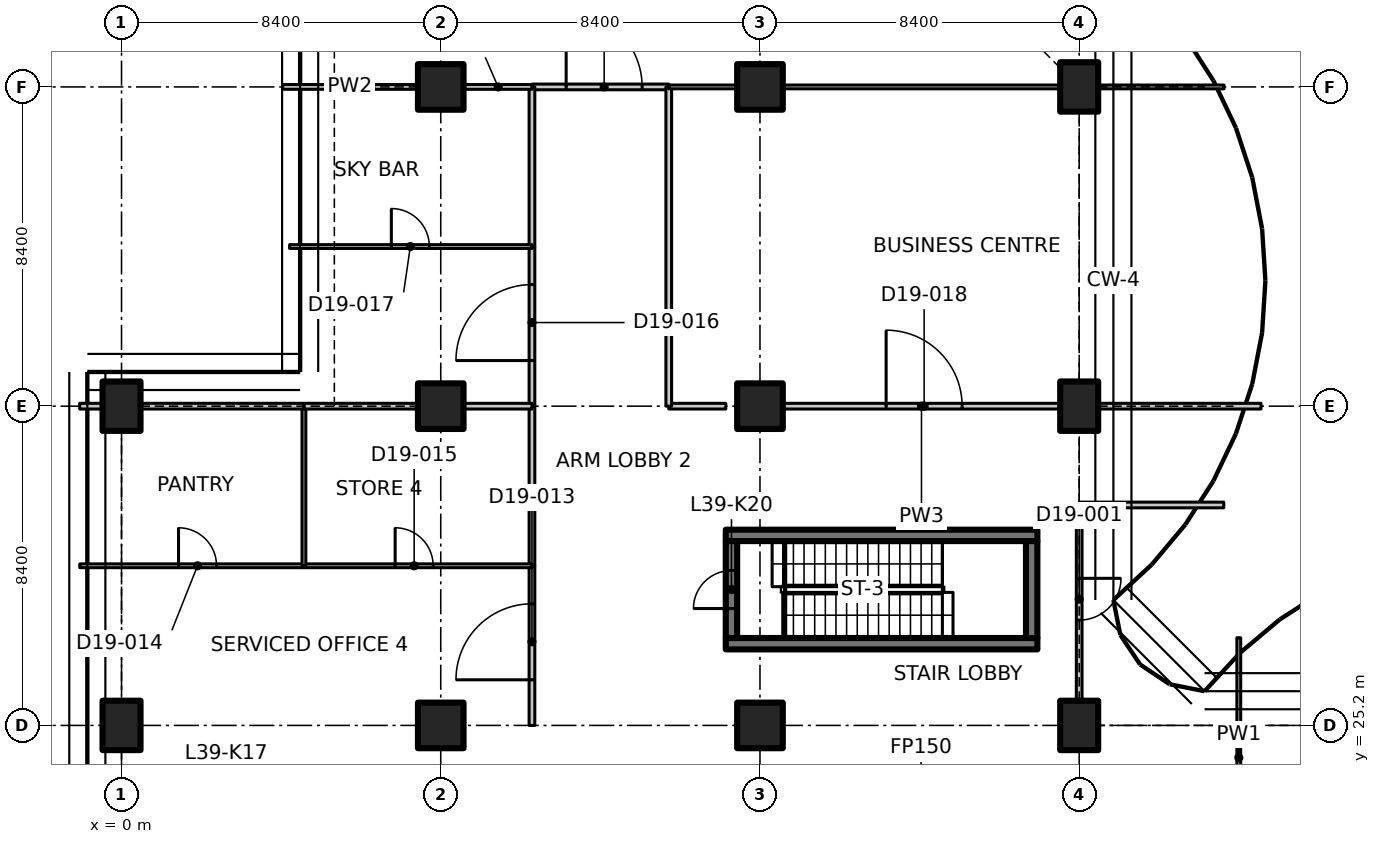
"""IFC4 building model, lengths in metres.
Left out: names, types, materials, properties, quantities, classifications, styles, units other than length and angle.
Written with IfcOpenShell. Run it as: python <this file> out.ifc"""

import sys

from ifc_helpers import new_model, si_unit, direction, frame, frame_2d, origin, origin_2d, place, context, subcontext, project, spatial, polyline, rectangle, outline, extrude, element, fill, save


model = new_model("IFC4")
c1 = context("Model", 3, precision=1e-05, world=origin(), true_north=direction((0.0, 1.0)))
c2 = subcontext(c1, "Body", "Model", "MODEL_VIEW")
j1 = project(units=[si_unit("LENGTHUNIT", "METRE"), si_unit("PLANEANGLEUNIT", "RADIAN")], contexts=[c1])
p1 = place(None, origin())
s1 = spatial("IfcSite", under=j1, at=p1, CompositionType="ELEMENT")
p2 = place(p1, origin())
s2 = spatial("IfcBuilding", under=s1, at=p2, CompositionType="ELEMENT")
p3 = place(p2, frame((0.0, 0.0, 156.5)))
s3 = spatial("IfcBuildingStorey", under=s2, at=p3, CompositionType="ELEMENT", Elevation=156.5)
for number, where, z_axis, x_axis in (
    (1, (0.0, 25.2, 0.0), (0.0, 0.0, 1.0), (1.0, 0.0, 0.0)),
    (2, (0.0, 33.6, 0.0), (0.0, 0.0, 1.0), (1.0, 0.0, 0.0)),
):
    element("IfcColumn", number, at=place(p3, frame(where, z_axis=z_axis, x_axis=x_axis)), inside=s3, PredefinedType="COLUMN", context=c2, shape_type="SweptSolid", body=[
        extrude(rectangle(XDim=1.0, YDim=1.3, at=origin_2d()), origin(), (0.0, 0.0, 1.0), 5.2),
    ])
for number, where, z_axis, x_axis in (
    (3, (8.4, 25.2, 0.0), (0.0, 0.0, 1.0), (1.0, 0.0, 0.0)),
    (4, (8.4, 33.6, 0.0), (0.0, 0.0, 1.0), (1.0, 0.0, 0.0)),
    (5, (8.4, 42.0, 0.0), (0.0, 0.0, 1.0), (1.0, 0.0, 0.0)),
    (6, (16.8, 25.2, 0.0), (0.0, 0.0, 1.0), (1.0, 0.0, 0.0)),
    (7, (16.8, 33.6, 0.0), (0.0, 0.0, 1.0), (1.0, 0.0, 0.0)),
    (8, (16.8, 42.0, 0.0), (0.0, 0.0, 1.0), (1.0, 0.0, 0.0)),
):
    element("IfcColumn", number, at=place(p3, frame(where, z_axis=z_axis, x_axis=x_axis)), inside=s3, PredefinedType="COLUMN", context=c2, shape_type="SweptSolid", body=[
        extrude(rectangle(XDim=1.2, YDim=1.2, at=origin_2d()), origin(), (0.0, 0.0, 1.0), 5.2),
    ])
for number, where, z_axis, x_axis in (
    (9, (25.2, 25.2, 0.0), (0.0, 0.0, 1.0), (1.0, 0.0, 0.0)),
    (10, (25.2, 33.6, 0.0), (0.0, 0.0, 1.0), (1.0, 0.0, 0.0)),
    (11, (25.2, 42.0, 0.0), (0.0, 0.0, 1.0), (1.0, 0.0, 0.0)),
):
    element("IfcColumn", number, at=place(p3, frame(where, z_axis=z_axis, x_axis=x_axis)), inside=s3, PredefinedType="COLUMN", context=c2, shape_type="SweptSolid", body=[
        extrude(rectangle(XDim=1.0, YDim=1.3, at=origin_2d()), origin(), (0.0, 0.0, 1.0), 5.2),
    ])
for number, where, z_axis, x_axis in (
    (12, (15.9, 27.35, 0.0), (0.0, 0.0, 1.0), (1.0, 0.0, 0.0)),
    (13, (15.9, 30.2, 0.0), (0.0, 0.0, 1.0), (1.0, 0.0, 0.0)),
):
    element("IfcWall", number, at=place(p3, frame(where, z_axis=z_axis, x_axis=x_axis)), inside=s3, PredefinedType="SHEAR", context=c2, shape_type="SweptSolid", body=[
        extrude(rectangle(XDim=8.2, YDim=0.3, at=frame_2d((4.1, 0.0))), origin(), (0.0, 0.0, 1.0), 5.2),
    ])
p4 = place(p3, frame((16.05, 27.5, 0.0), z_axis=(0.0, 0.0, 1.0), x_axis=(0.0, 1.0, 0.0)))
e14 = element("IfcWall", 14, at=p4, inside=s3, PredefinedType="SHEAR", context=c2, shape_type="SweptSolid", body=[
    extrude(rectangle(XDim=2.55, YDim=0.3, at=frame_2d((1.275, 0.0))), origin(), (0.0, 0.0, 1.0), 5.2),
])
p5 = place(p4, frame((0.775, 0.0, 0.0)))
e15 = element("IfcOpeningElement", 15, at=p5, cuts=e14, PredefinedType="OPENING", context=c2, shape_type="SweptSolid", body=[
    extrude(rectangle(XDim=1.0, YDim=2.1, at=frame_2d((0.5, 1.05))), frame((0.0, 0.16, 0.0), z_axis=(0.0, -1.0, 0.0), x_axis=(1.0, 0.0, 0.0)), (0.0, 0.0, 1.0), 0.32),
])
p6 = place(p3, frame((23.95, 27.5, 0.0), z_axis=(0.0, 0.0, 1.0), x_axis=(0.0, 1.0, 0.0)))
e16 = element("IfcWall", 16, at=p6, inside=s3, PredefinedType="SHEAR", context=c2, shape_type="SweptSolid", body=[
    extrude(rectangle(XDim=2.55, YDim=0.3, at=frame_2d((1.275, 0.0))), origin(), (0.0, 0.0, 1.0), 5.2),
])
p7 = place(p3, frame((29.4, 27.507, 0.0), z_axis=(0.0, 0.0, 1.0), x_axis=(0.0, -1.0, 0.0)))
e17 = element("IfcWall", 17, at=p7, inside=s3, PredefinedType="PARTITIONING", context=c2, shape_type="SweptSolid", body=[
    extrude(outline(polyline([(0.0, 0.0), (6.307, 0.0), (6.307, 5.18), (2.757, 5.18), (2.755, 4.83), (1.859, 4.83), (1.857, 5.18), (0.232, 5.18), (0.0, 5.18), (0.0, 0.0)])), frame((0.0, 0.05, 0.0), z_axis=(0.0, -1.0, 0.0), x_axis=(1.0, 0.0, 0.0)), (0.0, 0.0, 1.0), 0.1),
])
p8 = place(p3, frame((25.2, 31.0, 0.0), z_axis=(0.0, 0.0, 1.0), x_axis=(0.0, -1.0, 0.0)))
e18 = element("IfcWall", 18, at=p8, inside=s3, PredefinedType="PARTITIONING", context=c2, shape_type="SweptSolid", body=[
    extrude(outline(polyline([(0.0, 0.0), (5.13, 0.0), (5.13, 4.83), (0.0, 4.83), (0.0, 0.0)])), frame((0.0, 0.075, 0.0), z_axis=(0.0, -1.0, 0.0), x_axis=(1.0, 0.0, 0.0)), (0.0, 0.0, 1.0), 0.15),
])
p9 = place(p8, frame((1.93, 0.0, 0.0)))
e19 = element("IfcOpeningElement", 19, at=p9, cuts=e18, PredefinedType="OPENING", context=c2, shape_type="SweptSolid", body=[
    extrude(rectangle(XDim=1.1, YDim=2.1, at=frame_2d((0.55, 1.05))), frame((0.0, 0.085, 0.0), z_axis=(0.0, -1.0, 0.0), x_axis=(1.0, 0.0, 0.0)), (0.0, 0.0, 1.0), 0.17),
])
p10 = place(p3, frame((25.2, 31.0, 0.0), z_axis=(0.0, 0.0, 1.0), x_axis=(1.0, 0.0, 0.0)))
e20 = element("IfcWall", 20, at=p10, inside=s3, PredefinedType="PARTITIONING", context=c2, shape_type="SweptSolid", body=[
    extrude(rectangle(XDim=3.805, YDim=0.15, at=frame_2d((1.902, 0.0))), origin(), (0.0, 0.0, 1.0), 4.83),
])
p11 = place(p3, frame((10.8, 25.2, 0.0), z_axis=(0.0, 0.0, 1.0), x_axis=(0.0, 1.0, 0.0)))
e21 = element("IfcWall", 21, at=p11, inside=s3, PredefinedType="PARTITIONING", context=c2, shape_type="SweptSolid", body=[
    extrude(rectangle(XDim=4.2, YDim=0.15, at=frame_2d((2.1, 0.0))), origin(), (0.0, 0.0, 1.0), 5.18),
])
p12 = place(p11, frame((1.2, 0.0, 0.0)))
e22 = element("IfcOpeningElement", 22, at=p12, cuts=e21, PredefinedType="OPENING", context=c2, shape_type="SweptSolid", body=[
    extrude(rectangle(XDim=2.0, YDim=2.4, at=frame_2d((1.0, 1.2))), frame((0.0, 0.085, 0.0), z_axis=(0.0, -1.0, 0.0), x_axis=(1.0, 0.0, 0.0)), (0.0, 0.0, 1.0), 0.17),
])
p13 = place(p3, frame((10.8, 29.4, 0.0), z_axis=(0.0, 0.0, 1.0), x_axis=(0.0, 1.0, 0.0)))
e23 = element("IfcWall", 23, at=p13, inside=s3, PredefinedType="PARTITIONING", context=c2, shape_type="SweptSolid", body=[
    extrude(rectangle(XDim=4.2, YDim=0.15, at=frame_2d((2.1, 0.0))), origin(), (0.0, 0.0, 1.0), 5.18),
])
p14 = place(p3, frame((14.4, 33.6, 0.0), z_axis=(0.0, 0.0, 1.0), x_axis=(1.0, 0.0, 0.0)))
e24 = element("IfcWall", 24, at=p14, inside=s3, PredefinedType="PARTITIONING", context=c2, shape_type="SweptSolid", body=[
    extrude(rectangle(XDim=1.5, YDim=0.15, at=frame_2d((0.75, 0.0))), origin(), (0.0, 0.0, 1.0), 5.18),
])
p15 = place(p3, frame((17.42, 33.6, 0.0), z_axis=(0.0, 0.0, 1.0), x_axis=(1.0, 0.0, 0.0)))
e25 = element("IfcWall", 25, at=p15, inside=s3, PredefinedType="PARTITIONING", context=c2, shape_type="SweptSolid", body=[
    extrude(rectangle(XDim=7.26, YDim=0.15, at=frame_2d((3.63, 0.0))), origin(), (0.0, 0.0, 1.0), 5.18),
])
p16 = place(p15, frame((2.7, 0.0, 0.0)))
e26 = element("IfcOpeningElement", 26, at=p16, cuts=e25, PredefinedType="OPENING", context=c2, shape_type="SweptSolid", body=[
    extrude(rectangle(XDim=2.0, YDim=2.4, at=frame_2d((1.0, 1.2))), frame((0.0, 0.085, 0.0), z_axis=(0.0, -1.0, 0.0), x_axis=(1.0, 0.0, 0.0)), (0.0, 0.0, 1.0), 0.17),
])
p17 = place(p3, frame((25.72, 33.6, 0.0), z_axis=(0.0, 0.0, 1.0), x_axis=(1.0, 0.0, 0.0)))
e27 = element("IfcWall", 27, at=p17, inside=s3, PredefinedType="PARTITIONING", context=c2, shape_type="SweptSolid", body=[
    extrude(rectangle(XDim=4.265, YDim=0.15, at=frame_2d((2.132, 0.0))), origin(), (0.0, 0.0, 1.0), 4.83),
])
p18 = place(p3, frame((10.8, 42.0, 0.0), z_axis=(0.0, 0.0, 1.0), x_axis=(1.0, 0.0, 0.0)))
e28 = element("IfcWall", 28, at=p18, inside=s3, PredefinedType="PARTITIONING", context=c2, shape_type="SweptSolid", body=[
    extrude(rectangle(XDim=3.6, YDim=0.15, at=frame_2d((1.8, 0.0))), origin(), (0.0, 0.0, 1.0), 5.18),
])
p19 = place(p18, frame((0.9, 0.0, 0.0)))
e29 = element("IfcOpeningElement", 29, at=p19, cuts=e28, PredefinedType="OPENING", context=c2, shape_type="SweptSolid", body=[
    extrude(rectangle(XDim=2.0, YDim=2.4, at=frame_2d((1.0, 1.2))), frame((0.0, 0.085, 0.0), z_axis=(0.0, -1.0, 0.0), x_axis=(1.0, 0.0, 0.0)), (0.0, 0.0, 1.0), 0.17),
])
p20 = place(p3, frame((10.8, 33.6, 0.0), z_axis=(0.0, 0.0, 1.0), x_axis=(0.0, 1.0, 0.0)))
e30 = element("IfcWall", 30, at=p20, inside=s3, PredefinedType="PARTITIONING", context=c2, shape_type="SweptSolid", body=[
    extrude(rectangle(XDim=4.2, YDim=0.15, at=frame_2d((2.1, 0.0))), origin(), (0.0, 0.0, 1.0), 5.18),
])
p21 = place(p20, frame((1.2, 0.0, 0.0)))
e31 = element("IfcOpeningElement", 31, at=p21, cuts=e30, PredefinedType="OPENING", context=c2, shape_type="SweptSolid", body=[
    extrude(rectangle(XDim=2.0, YDim=2.4, at=frame_2d((1.0, 1.2))), frame((0.0, 0.085, 0.0), z_axis=(0.0, -1.0, 0.0), x_axis=(1.0, 0.0, 0.0)), (0.0, 0.0, 1.0), 0.17),
])
p22 = place(p3, frame((10.8, 37.8, 0.0), z_axis=(0.0, 0.0, 1.0), x_axis=(0.0, 1.0, 0.0)))
e32 = element("IfcWall", 32, at=p22, inside=s3, PredefinedType="PARTITIONING", context=c2, shape_type="SweptSolid", body=[
    extrude(rectangle(XDim=4.2, YDim=0.15, at=frame_2d((2.1, 0.0))), origin(), (0.0, 0.0, 1.0), 5.18),
])
p23 = place(p3, frame((14.4, 42.0, 0.0), z_axis=(0.0, 0.0, 1.0), x_axis=(0.0, -1.0, 0.0)))
e33 = element("IfcWall", 33, at=p23, inside=s3, PredefinedType="PARTITIONING", context=c2, shape_type="SweptSolid", body=[
    extrude(rectangle(XDim=8.4, YDim=0.15, at=frame_2d((4.2, 0.0))), origin(), (0.0, 0.0, 1.0), 5.18),
])
p24 = place(p3, frame((10.8, 42.0, 0.0), z_axis=(0.0, 0.0, 1.0), x_axis=(-1.0, 0.0, 0.0)))
e34 = element("IfcWall", 34, at=p24, inside=s3, PredefinedType="PARTITIONING", context=c2, shape_type="SweptSolid", body=[
    extrude(rectangle(XDim=1.78, YDim=0.125, at=frame_2d((0.89, 0.0))), origin(), (0.0, 0.0, 1.0), 5.18),
])
p25 = place(p3, frame((7.78, 42.0, 0.0), z_axis=(0.0, 0.0, 1.0), x_axis=(-1.0, 0.0, 0.0)))
e35 = element("IfcWall", 35, at=p25, inside=s3, PredefinedType="PARTITIONING", context=c2, shape_type="SweptSolid", body=[
    extrude(rectangle(XDim=3.54, YDim=0.125, at=frame_2d((1.77, 0.0))), origin(), (0.0, 0.0, 1.0), 4.83),
])
p26 = place(p3, frame((29.011, 42.0, 0.0), z_axis=(0.0, 0.0, 1.0), x_axis=(-1.0, 0.0, 0.0)))
e36 = element("IfcWall", 36, at=p26, inside=s3, PredefinedType="PARTITIONING", context=c2, shape_type="SweptSolid", body=[
    extrude(rectangle(XDim=3.292, YDim=0.1, at=frame_2d((1.646, 0.0))), origin(), (0.0, 0.0, 1.0), 4.83),
])
p27 = place(p3, frame((24.68, 42.0, 0.0), z_axis=(0.0, 0.0, 1.0), x_axis=(-1.0, 0.0, 0.0)))
e37 = element("IfcWall", 37, at=p27, inside=s3, PredefinedType="PARTITIONING", context=c2, shape_type="SweptSolid", body=[
    extrude(outline(polyline([(0.0, 0.0), (7.26, 0.0), (7.26, 5.18), (0.146, 5.18), (0.144, 4.83), (0.0, 4.83), (0.0, 0.0)])), frame((0.0, 0.05, 0.0), z_axis=(0.0, -1.0, 0.0), x_axis=(1.0, 0.0, 0.0)), (0.0, 0.0, 1.0), 0.1),
])
p28 = place(p3, frame((16.18, 42.0, 0.0), z_axis=(0.0, 0.0, 1.0), x_axis=(-1.0, 0.0, 0.0)))
e38 = element("IfcWall", 38, at=p28, inside=s3, PredefinedType="PARTITIONING", context=c2, shape_type="SweptSolid", body=[
    extrude(rectangle(XDim=1.78, YDim=0.1, at=frame_2d((0.89, 0.0))), origin(), (0.0, 0.0, 1.0), 5.18),
])
p29 = place(p3, frame((-1.1, 29.4, 0.0), z_axis=(0.0, 0.0, 1.0), x_axis=(1.0, 0.0, 0.0)))
e39 = element("IfcWall", 39, at=p29, inside=s3, PredefinedType="PARTITIONING", context=c2, shape_type="SweptSolid", body=[
    extrude(outline(polyline([(0.0, 0.0), (5.9, 0.0), (5.9, 5.18), (1.55, 5.18), (1.548, 4.83), (0.652, 4.83), (0.65, 5.18), (0.0, 5.18), (0.0, 0.0)])), frame((0.0, 0.05, 0.0), z_axis=(0.0, -1.0, 0.0), x_axis=(1.0, 0.0, 0.0)), (0.0, 0.0, 1.0), 0.1),
])
p30 = place(p29, frame((2.6, 0.0, 0.0)))
e40 = element("IfcOpeningElement", 40, at=p30, cuts=e39, PredefinedType="OPENING", context=c2, shape_type="SweptSolid", body=[
    extrude(rectangle(XDim=1.0, YDim=2.1, at=frame_2d((0.5, 1.05))), frame((0.0, 0.06, 0.0), z_axis=(0.0, -1.0, 0.0), x_axis=(1.0, 0.0, 0.0)), (0.0, 0.0, 1.0), 0.12),
])
p31 = place(p3, frame((4.8, 29.4, 0.0), z_axis=(0.0, 0.0, 1.0), x_axis=(1.0, 0.0, 0.0)))
e41 = element("IfcWall", 41, at=p31, inside=s3, PredefinedType="PARTITIONING", context=c2, shape_type="SweptSolid", body=[
    extrude(rectangle(XDim=6.0, YDim=0.1, at=frame_2d((3.0, 0.0))), origin(), (0.0, 0.0, 1.0), 5.18),
])
p32 = place(p31, frame((2.4, 0.0, 0.0)))
e42 = element("IfcOpeningElement", 42, at=p32, cuts=e41, PredefinedType="OPENING", context=c2, shape_type="SweptSolid", body=[
    extrude(rectangle(XDim=1.0, YDim=2.1, at=frame_2d((0.5, 1.05))), frame((0.0, 0.06, 0.0), z_axis=(0.0, -1.0, 0.0), x_axis=(1.0, 0.0, 0.0)), (0.0, 0.0, 1.0), 0.12),
])
p33 = place(p3, frame((4.8, 33.6, 0.0), z_axis=(0.0, 0.0, 1.0), x_axis=(0.0, -1.0, 0.0)))
e43 = element("IfcWall", 43, at=p33, inside=s3, PredefinedType="PARTITIONING", context=c2, shape_type="SweptSolid", body=[
    extrude(rectangle(XDim=4.2, YDim=0.1, at=frame_2d((2.1, 0.0))), origin(), (0.0, 0.0, 1.0), 4.83),
])
p34 = place(p3, frame((-1.1, 33.6, 0.0), z_axis=(0.0, 0.0, 1.0), x_axis=(1.0, 0.0, 0.0)))
e44 = element("IfcWall", 44, at=p34, inside=s3, PredefinedType="PARTITIONING", context=c2, shape_type="SweptSolid", body=[
    extrude(rectangle(XDim=0.58, YDim=0.15, at=frame_2d((0.29, 0.0))), origin(), (0.0, 0.0, 1.0), 5.18),
])
p35 = place(p3, frame((0.52, 33.6, 0.0), z_axis=(0.0, 0.0, 1.0), x_axis=(1.0, 0.0, 0.0)))
e45 = element("IfcWall", 45, at=p35, inside=s3, PredefinedType="PARTITIONING", context=c2, shape_type="SweptSolid", body=[
    extrude(rectangle(XDim=4.28, YDim=0.15, at=frame_2d((2.14, 0.0))), origin(), (0.0, 0.0, 1.0), 4.83),
])
p36 = place(p3, frame((4.8, 33.6, 0.0), z_axis=(0.0, 0.0, 1.0), x_axis=(1.0, 0.0, 0.0)))
e46 = element("IfcWall", 46, at=p36, inside=s3, PredefinedType="PARTITIONING", context=c2, shape_type="SweptSolid", body=[
    extrude(rectangle(XDim=2.98, YDim=0.15, at=frame_2d((1.49, 0.0))), origin(), (0.0, 0.0, 1.0), 4.83),
])
p37 = place(p3, frame((9.02, 33.6, 0.0), z_axis=(0.0, 0.0, 1.0), x_axis=(1.0, 0.0, 0.0)))
e47 = element("IfcWall", 47, at=p37, inside=s3, PredefinedType="PARTITIONING", context=c2, shape_type="SweptSolid", body=[
    extrude(rectangle(XDim=1.78, YDim=0.15, at=frame_2d((0.89, 0.0))), origin(), (0.0, 0.0, 1.0), 5.18),
])
p38 = place(p3, frame((4.421, 37.8, 0.0), z_axis=(0.0, 0.0, 1.0), x_axis=(1.0, 0.0, 0.0)))
e48 = element("IfcWall", 48, at=p38, inside=s3, PredefinedType="PARTITIONING", context=c2, shape_type="SweptSolid", body=[
    extrude(outline(polyline([(0.0, 0.0), (6.379, 0.0), (6.379, 5.18), (1.629, 5.18), (1.627, 4.83), (0.731, 4.83), (0.729, 5.18), (0.079, 5.18), (0.0, 5.18), (0.0, 0.0)])), frame((0.0, 0.05, 0.0), z_axis=(0.0, -1.0, 0.0), x_axis=(1.0, 0.0, 0.0)), (0.0, 0.0, 1.0), 0.1),
])
p39 = place(p38, frame((2.679, 0.0, 0.0)))
e49 = element("IfcOpeningElement", 49, at=p39, cuts=e48, PredefinedType="OPENING", context=c2, shape_type="SweptSolid", body=[
    extrude(rectangle(XDim=1.0, YDim=2.1, at=frame_2d((0.5, 1.05))), frame((0.0, 0.06, 0.0), z_axis=(0.0, -1.0, 0.0), x_axis=(1.0, 0.0, 0.0)), (0.0, 0.0, 1.0), 0.12),
])
p40 = place(p5, origin())
e50 = element("IfcDoor", 50, at=p40, inside=s3, OperationType="SINGLE_SWING_RIGHT", PredefinedType="DOOR", context=c2, shape_type="SweptSolid", body=[
    extrude(rectangle(XDim=1.0, YDim=2.1, at=frame_2d((0.5, 1.05))), frame((0.0, 0.025, 0.0), z_axis=(0.0, -1.0, 0.0), x_axis=(1.0, 0.0, 0.0)), (0.0, 0.0, 1.0), 0.05),
])
fill(e15, e50)
p41 = place(p9, origin())
e51 = element("IfcDoor", 51, at=p41, inside=s3, OperationType="SINGLE_SWING_RIGHT", PredefinedType="DOOR", context=c2, shape_type="SweptSolid", body=[
    extrude(rectangle(XDim=1.1, YDim=2.1, at=frame_2d((0.55, 1.05))), frame((0.0, 0.025, 0.0), z_axis=(0.0, -1.0, 0.0), x_axis=(1.0, 0.0, 0.0)), (0.0, 0.0, 1.0), 0.05),
])
fill(e19, e51)
p42 = place(p19, origin())
e52 = element("IfcDoor", 52, at=p42, inside=s3, OperationType="DOUBLE_DOOR_SINGLE_SWING", PredefinedType="DOOR", context=c2, shape_type="SweptSolid", body=[
    extrude(rectangle(XDim=2.0, YDim=2.4, at=frame_2d((1.0, 1.2))), frame((0.0, 0.025, 0.0), z_axis=(0.0, -1.0, 0.0), x_axis=(1.0, 0.0, 0.0)), (0.0, 0.0, 1.0), 0.05),
])
fill(e29, e52)
p43 = place(p12, origin())
e53 = element("IfcDoor", 53, at=p43, inside=s3, OperationType="DOUBLE_DOOR_SINGLE_SWING", PredefinedType="DOOR", context=c2, shape_type="SweptSolid", body=[
    extrude(rectangle(XDim=2.0, YDim=2.4, at=frame_2d((1.0, 1.2))), frame((0.0, 0.025, 0.0), z_axis=(0.0, -1.0, 0.0), x_axis=(1.0, 0.0, 0.0)), (0.0, 0.0, 1.0), 0.05),
])
fill(e22, e53)
p44 = place(p30, origin())
e54 = element("IfcDoor", 54, at=p44, inside=s3, OperationType="SINGLE_SWING_LEFT", PredefinedType="DOOR", context=c2, shape_type="SweptSolid", body=[
    extrude(rectangle(XDim=1.0, YDim=2.1, at=frame_2d((0.5, 1.05))), frame((0.0, 0.025, 0.0), z_axis=(0.0, -1.0, 0.0), x_axis=(1.0, 0.0, 0.0)), (0.0, 0.0, 1.0), 0.05),
])
fill(e40, e54)
p45 = place(p32, origin())
e55 = element("IfcDoor", 55, at=p45, inside=s3, OperationType="SINGLE_SWING_LEFT", PredefinedType="DOOR", context=c2, shape_type="SweptSolid", body=[
    extrude(rectangle(XDim=1.0, YDim=2.1, at=frame_2d((0.5, 1.05))), frame((0.0, 0.025, 0.0), z_axis=(0.0, -1.0, 0.0), x_axis=(1.0, 0.0, 0.0)), (0.0, 0.0, 1.0), 0.05),
])
fill(e42, e55)
p46 = place(p21, origin())
e56 = element("IfcDoor", 56, at=p46, inside=s3, OperationType="DOUBLE_DOOR_SINGLE_SWING", PredefinedType="DOOR", context=c2, shape_type="SweptSolid", body=[
    extrude(rectangle(XDim=2.0, YDim=2.4, at=frame_2d((1.0, 1.2))), frame((0.0, 0.025, 0.0), z_axis=(0.0, -1.0, 0.0), x_axis=(1.0, 0.0, 0.0)), (0.0, 0.0, 1.0), 0.05),
])
fill(e31, e56)
p47 = place(p39, origin())
e57 = element("IfcDoor", 57, at=p47, inside=s3, OperationType="SINGLE_SWING_LEFT", PredefinedType="DOOR", context=c2, shape_type="SweptSolid", body=[
    extrude(rectangle(XDim=1.0, YDim=2.1, at=frame_2d((0.5, 1.05))), frame((0.0, 0.025, 0.0), z_axis=(0.0, -1.0, 0.0), x_axis=(1.0, 0.0, 0.0)), (0.0, 0.0, 1.0), 0.05),
])
fill(e49, e57)
p48 = place(p16, origin())
e58 = element("IfcDoor", 58, at=p48, inside=s3, OperationType="DOUBLE_DOOR_SINGLE_SWING", PredefinedType="DOOR", context=c2, shape_type="SweptSolid", body=[
    extrude(rectangle(XDim=2.0, YDim=2.4, at=frame_2d((1.0, 1.2))), frame((0.0, 0.025, 0.0), z_axis=(0.0, -1.0, 0.0), x_axis=(1.0, 0.0, 0.0)), (0.0, 0.0, 1.0), 0.05),
])
fill(e26, e58)
save(model, sys.argv[1])
